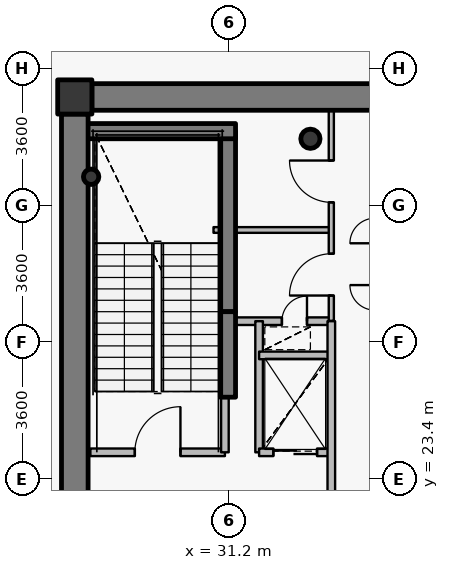
"""IFC4 building model, lengths in metres.
Left out: names, types, materials, properties, quantities, classifications, styles, units other than length and angle.
Written with IfcOpenShell. Run it as: python <this file> out.ifc"""

import sys

from ifc_helpers import new_model, si_unit, direction, frame, frame_2d, origin, origin_2d, place, context, subcontext, project, spatial, rectangle, hollow_circle, extrude, source, transform, mapped, element, fill, save


model = new_model("IFC4")
c1 = context("Model", 3, precision=1e-05, world=origin(), true_north=direction((0.0, 1.0)))
c2 = subcontext(c1, "Body", "Model", "MODEL_VIEW")
j1 = project(units=[si_unit("LENGTHUNIT", "METRE"), si_unit("PLANEANGLEUNIT", "RADIAN")], contexts=[c1])
p1 = place(None, origin())
s1 = spatial("IfcSite", under=j1, at=p1, CompositionType="ELEMENT")
p2 = place(p1, origin())
s2 = spatial("IfcBuilding", under=s1, at=p2, CompositionType="ELEMENT")
p3 = place(p2, frame((0.0, 0.0, 351.0)))
s3 = spatial("IfcBuildingStorey", under=s2, at=p3, CompositionType="ELEMENT", Elevation=351.0)
p4 = place(p3, frame((27.15, 33.45, 0.0), z_axis=(0.0, 0.0, 1.0), x_axis=(1.0, 0.0, 0.0)))
e1 = element("IfcColumn", 1, at=p4, inside=s3, PredefinedType="COLUMN", context=c2, shape_type="SweptSolid", body=[
    extrude(rectangle(XDim=0.9, YDim=0.9, at=origin_2d()), origin(), (0.0, 0.0, 1.0), 4.2),
])
p5 = place(p3, frame((33.35, 32.35, 0.0), z_axis=(0.0, 0.0, 1.0), x_axis=(1.0, 0.0, 0.0)))
e2 = element("IfcColumn", 2, at=p5, inside=s3, PredefinedType="COLUMN", context=c2, shape_type="SweptSolid", body=[
    extrude(hollow_circle(Radius=0.254, WallThickness=0.02, at=origin_2d()), origin(), (0.0, 0.0, 1.0), 4.2),
])
p6 = place(p3, frame((31.18, 27.8, 0.0), z_axis=(0.0, 0.0, 1.0), x_axis=(0.0, 1.0, 0.0)))
e3 = element("IfcWall", 3, at=p6, inside=s3, PredefinedType="SHEAR", context=c2, shape_type="SweptSolid", body=[
    extrude(rectangle(XDim=4.75, YDim=0.4, at=frame_2d((2.375, 0.0))), origin(), (0.0, 0.0, 1.0), 4.2),
])
p7 = place(p3, frame((27.25, 32.55, 0.0), z_axis=(0.0, 0.0, 1.0), x_axis=(1.0, 0.0, 0.0)))
e4 = element("IfcWall", 4, at=p7, inside=s3, PredefinedType="SHEAR", context=c2, shape_type="SweptSolid", body=[
    extrude(rectangle(XDim=4.13, YDim=0.4, at=frame_2d((2.065, 0.0))), origin(), (0.0, 0.0, 1.0), 4.2),
])
p8 = place(p3, frame((27.58, 31.35, 0.0), z_axis=(0.0, 0.0, 1.0), x_axis=(1.0, 0.0, 0.0)))
e5 = element("IfcColumn", 5, at=p8, inside=s3, PredefinedType="COLUMN", context=c2, shape_type="SweptSolid", body=[
    extrude(hollow_circle(Radius=0.203, WallThickness=0.016, at=origin_2d()), origin(), (0.0, 0.0, 1.0), 4.2),
])
p9 = place(p3, frame((27.6, 33.45, 0.0), z_axis=(0.0, 0.0, 1.0), x_axis=(1.0, 0.0, 0.0)))
e6 = element("IfcWall", 6, at=p9, inside=s3, PredefinedType="SHEAR", context=c2, shape_type="SweptSolid", body=[
    extrude(rectangle(XDim=16.8, YDim=0.7, at=frame_2d((8.4, 0.0))), origin(), (0.0, 0.0, 1.0), 3.5),
])
p10 = place(p9, frame((12.85, 0.0, 0.0)))
e7 = element("IfcOpeningElement", 7, at=p10, cuts=e6, PredefinedType="OPENING", context=c2, shape_type="SweptSolid", body=[
    extrude(rectangle(XDim=1.15, YDim=2.15, at=origin_2d()), frame((0.575, 0.36, 1.075), z_axis=(0.0, -1.0, 0.0), x_axis=(1.0, 0.0, 0.0)), (0.0, 0.0, 1.0), 0.72),
])
p11 = place(p3, frame((27.15, 21.0, 0.0), z_axis=(0.0, 0.0, 1.0), x_axis=(0.0, 1.0, 0.0)))
e8 = element("IfcWall", 8, at=p11, inside=s3, PredefinedType="SHEAR", context=c2, shape_type="SweptSolid", body=[
    extrude(rectangle(XDim=12.0, YDim=0.7, at=frame_2d((6.0, 0.0))), origin(), (0.0, 0.0, 1.0), 3.5),
])
p12 = place(p3, frame((31.18, 25.55, 0.0), z_axis=(0.0, 0.0, 1.0), x_axis=(0.0, 1.0, 0.0)))
e9 = element("IfcWall", 9, at=p12, inside=s3, PredefinedType="SHEAR", context=c2, shape_type="SweptSolid", body=[
    extrude(rectangle(XDim=2.25, YDim=0.4, at=frame_2d((1.125, 0.0))), origin(), (0.0, 0.0, 1.0), 3.55),
])
p13 = place(p3, frame((27.56, 24.1, 0.0), z_axis=(0.0, 0.0, 1.0), x_axis=(1.0, 0.0, 0.0)))
e10 = element("IfcWall", 10, at=p13, inside=s3, PredefinedType="PARTITIONING", context=c2, shape_type="SweptSolid", body=[
    extrude(rectangle(XDim=3.54, YDim=0.2, at=frame_2d((1.77, 0.0))), origin(), (0.0, 0.0, 1.0), 3.95),
])
p14 = place(p13, frame((1.17, 0.0, 0.0)))
e11 = element("IfcOpeningElement", 11, at=p14, cuts=e10, PredefinedType="OPENING", context=c2, shape_type="SweptSolid", body=[
    extrude(rectangle(XDim=1.2, YDim=2.15, at=origin_2d()), frame((0.6, 0.11, 1.075), z_axis=(0.0, -1.0, 0.0), x_axis=(1.0, 0.0, 0.0)), (0.0, 0.0, 1.0), 0.22),
])
p15 = place(p3, frame((30.8, 29.95, 0.0), z_axis=(0.0, 0.0, 1.0), x_axis=(1.0, 0.0, 0.0)))
e12 = element("IfcWall", 12, at=p15, inside=s3, PredefinedType="PARTITIONING", context=c2, shape_type="SweptSolid", body=[
    extrude(rectangle(XDim=3.1, YDim=0.15, at=frame_2d((1.55, 0.0))), origin(), (0.0, 0.0, 1.0), 3.535),
])
p16 = place(p3, frame((31.1, 24.1, 0.0), z_axis=(0.0, 0.0, 1.0), x_axis=(0.0, 1.0, 0.0)))
e13 = element("IfcWall", 13, at=p16, inside=s3, PredefinedType="PARTITIONING", context=c2, shape_type="SweptSolid", body=[
    extrude(rectangle(XDim=1.44, YDim=0.2, at=frame_2d((0.72, 0.0))), origin(), (0.0, 0.0, 1.0), 3.95),
])
p17 = place(p3, frame((31.1, 27.55, 0.0), z_axis=(0.0, 0.0, 1.0), x_axis=(1.0, 0.0, 0.0)))
e14 = element("IfcWall", 14, at=p17, inside=s3, PredefinedType="PARTITIONING", context=c2, shape_type="SweptSolid", body=[
    extrude(rectangle(XDim=2.8, YDim=0.2, at=frame_2d((1.4, 0.0))), origin(), (0.0, 0.0, 1.0), 3.535),
])
p18 = place(p17, frame((1.5, 0.0, 0.0)))
e15 = element("IfcOpeningElement", 15, at=p18, cuts=e14, PredefinedType="OPENING", context=c2, shape_type="SweptSolid", body=[
    extrude(rectangle(XDim=0.66, YDim=2.05, at=origin_2d()), frame((0.33, 0.11, 1.025), z_axis=(0.0, -1.0, 0.0), x_axis=(1.0, 0.0, 0.0)), (0.0, 0.0, 1.0), 0.22),
])
p19 = place(p3, frame((32.0, 24.1, 0.0), z_axis=(0.0, 0.0, 1.0), x_axis=(0.0, 1.0, 0.0)))
e16 = element("IfcWall", 16, at=p19, inside=s3, PredefinedType="PARTITIONING", context=c2, shape_type="SweptSolid", body=[
    extrude(rectangle(XDim=3.45, YDim=0.2, at=frame_2d((1.725, 0.0))), origin(), (0.0, 0.0, 1.0), 3.95),
])
p20 = place(p3, frame((32.0, 24.1, 0.0), z_axis=(0.0, 0.0, 1.0), x_axis=(1.0, 0.0, 0.0)))
e17 = element("IfcWall", 17, at=p20, inside=s3, PredefinedType="PARTITIONING", context=c2, shape_type="SweptSolid", body=[
    extrude(rectangle(XDim=1.9, YDim=0.2, at=frame_2d((0.95, 0.0))), origin(), (0.0, 0.0, 1.0), 3.535),
])
p21 = place(p20, frame((0.375, 0.0, 0.0)))
e18 = element("IfcOpeningElement", 18, at=p21, cuts=e17, PredefinedType="OPENING", context=c2, shape_type="SweptSolid", body=[
    extrude(rectangle(XDim=1.15, YDim=2.15, at=origin_2d()), frame((0.575, 0.11, 1.075), z_axis=(0.0, -1.0, 0.0), x_axis=(1.0, 0.0, 0.0)), (0.0, 0.0, 1.0), 0.22),
])
p22 = place(p3, frame((32.0, 26.65, 0.0), z_axis=(0.0, 0.0, 1.0), x_axis=(1.0, 0.0, 0.0)))
e19 = element("IfcWall", 19, at=p22, inside=s3, PredefinedType="PARTITIONING", context=c2, shape_type="SweptSolid", body=[
    extrude(rectangle(XDim=1.9, YDim=0.2, at=frame_2d((0.95, 0.0))), origin(), (0.0, 0.0, 1.0), 3.535),
])
p23 = place(p3, frame((33.9, 20.9, 0.0), z_axis=(0.0, 0.0, 1.0), x_axis=(0.0, 1.0, 0.0)))
e20 = element("IfcWall", 20, at=p23, inside=s3, PredefinedType="PARTITIONING", context=c2, shape_type="SweptSolid", body=[
    extrude(rectangle(XDim=6.65, YDim=0.2, at=frame_2d((3.325, 0.0))), origin(), (0.0, 0.0, 1.0), 3.535),
])
p24 = place(p3, frame((33.9, 27.56, 0.0), z_axis=(0.0, 0.0, 1.0), x_axis=(0.0, 1.0, 0.0)))
e21 = element("IfcWall", 21, at=p24, inside=s3, PredefinedType="PARTITIONING", context=c2, shape_type="SweptSolid", body=[
    extrude(rectangle(XDim=5.54, YDim=0.135, at=frame_2d((2.77, 0.0))), origin(), (0.0, 0.0, 1.0), 3.535),
])
p25 = place(p24, frame((0.665, 0.0, 0.0)))
e22 = element("IfcOpeningElement", 22, at=p25, cuts=e21, PredefinedType="OPENING", context=c2, shape_type="SweptSolid", body=[
    extrude(rectangle(XDim=1.1, YDim=2.15, at=origin_2d()), frame((0.55, 0.078, 1.075), z_axis=(0.0, -1.0, 0.0), x_axis=(1.0, 0.0, 0.0)), (0.0, 0.0, 1.0), 0.155),
])
p26 = place(p24, frame((3.117, 0.0, 0.0)))
e23 = element("IfcOpeningElement", 23, at=p26, cuts=e21, PredefinedType="OPENING", context=c2, shape_type="SweptSolid", body=[
    extrude(rectangle(XDim=1.1, YDim=2.15, at=origin_2d()), frame((0.55, 0.078, 1.075), z_axis=(0.0, -1.0, 0.0), x_axis=(1.0, 0.0, 0.0)), (0.0, 0.0, 1.0), 0.155),
])
p27 = place(p3, frame((27.59, 33.8, 0.0), z_axis=(0.0, 0.0, 1.0), x_axis=(-1.0, 0.0, 0.0)))
e24 = element("IfcWall", 24, at=p27, inside=s3, PredefinedType="PARTITIONING", context=c2, shape_type="SweptSolid", body=[
    extrude(rectangle(XDim=0.79, YDim=0.135, at=frame_2d((0.395, 0.0))), origin(), (0.0, 0.0, 1.0), 2.735),
])
p28 = place(p3, frame((26.8, 33.492, 0.0), z_axis=(0.0, 0.0, 1.0), x_axis=(0.0, -1.0, 0.0)))
e25 = element("IfcWall", 25, at=p28, inside=s3, PredefinedType="PARTITIONING", context=c2, shape_type="SweptSolid", body=[
    extrude(rectangle(XDim=0.482, YDim=0.135, at=frame_2d((0.241, 0.0))), origin(), (0.0, 0.0, 1.0), 3.95),
])
m1 = source(origin(), c2, "Body", "SweptSolid", [
    extrude(rectangle(XDim=1.2, YDim=2.15, at=origin_2d()), frame((0.6, 0.025, 1.075), z_axis=(0.0, -1.0, 0.0), x_axis=(1.0, 0.0, 0.0)), (0.0, 0.0, 1.0), 0.05),
])
p29 = place(p14, origin())
e26 = element("IfcDoor", 26, at=p29, inside=s3, OperationType="SINGLE_SWING_RIGHT", PredefinedType="DOOR", context=c2, shape_type="MappedRepresentation", body=[
    mapped(m1, transform((0.0, 0.0, 0.0), x_axis=(1.0, 0.0, 0.0), y_axis=(0.0, 1.0, 0.0), z_axis=(0.0, 0.0, 1.0), scale=1.0)),
])
fill(e11, e26)
m2 = source(origin(), c2, "Body", "SweptSolid", [
    extrude(rectangle(XDim=1.15, YDim=2.15, at=origin_2d()), frame((0.575, 0.025, 1.075), z_axis=(0.0, -1.0, 0.0), x_axis=(1.0, 0.0, 0.0)), (0.0, 0.0, 1.0), 0.05),
])
p30 = place(p21, origin())
e27 = element("IfcDoor", 27, at=p30, inside=s3, OperationType="DOUBLE_DOOR_SLIDING", PredefinedType="USERDEFINED", context=c2, shape_type="MappedRepresentation", body=[
    mapped(m2, transform((0.0, 0.0, 0.0), x_axis=(1.0, 0.0, 0.0), y_axis=(0.0, 1.0, 0.0), z_axis=(0.0, 0.0, 1.0), scale=1.0)),
])
fill(e18, e27)
m3 = source(origin(), c2, "Body", "SweptSolid", [
    extrude(rectangle(XDim=1.1, YDim=2.15, at=origin_2d()), frame((0.55, 0.025, 1.075), z_axis=(0.0, -1.0, 0.0), x_axis=(1.0, 0.0, 0.0)), (0.0, 0.0, 1.0), 0.05),
])
p31 = place(p25, origin())
e28 = element("IfcDoor", 28, at=p31, inside=s3, OperationType="SINGLE_SWING_LEFT", PredefinedType="DOOR", context=c2, shape_type="MappedRepresentation", body=[
    mapped(m3, transform((0.0, 0.0, 0.0), x_axis=(1.0, 0.0, 0.0), y_axis=(0.0, 1.0, 0.0), z_axis=(0.0, 0.0, 1.0), scale=1.0)),
])
fill(e22, e28)
p32 = place(p26, origin())
e29 = element("IfcDoor", 29, at=p32, inside=s3, OperationType="SINGLE_SWING_RIGHT", PredefinedType="DOOR", context=c2, shape_type="MappedRepresentation", body=[
    mapped(m3, transform((0.0, 0.0, 0.0), x_axis=(1.0, 0.0, 0.0), y_axis=(0.0, 1.0, 0.0), z_axis=(0.0, 0.0, 1.0), scale=1.0)),
])
fill(e23, e29)
m4 = source(origin(), c2, "Body", "SweptSolid", [
    extrude(rectangle(XDim=0.66, YDim=2.05, at=origin_2d()), frame((0.33, 0.025, 1.025), z_axis=(0.0, -1.0, 0.0), x_axis=(1.0, 0.0, 0.0)), (0.0, 0.0, 1.0), 0.05),
])
p33 = place(p18, origin())
e30 = element("IfcDoor", 30, at=p33, inside=s3, OperationType="SINGLE_SWING_RIGHT", PredefinedType="USERDEFINED", context=c2, shape_type="MappedRepresentation", body=[
    mapped(m4, transform((0.0, 0.0, 0.0), x_axis=(1.0, 0.0, 0.0), y_axis=(0.0, 1.0, 0.0), z_axis=(0.0, 0.0, 1.0), scale=1.0)),
])
fill(e15, e30)
save(model, sys.argv[1])
